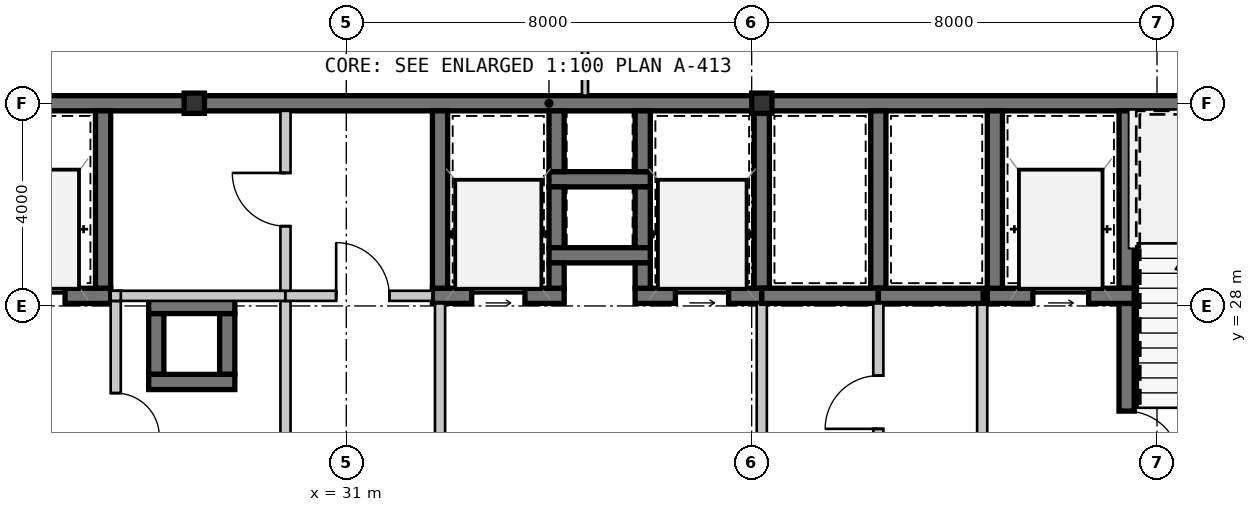
"""IFC4 building model, lengths in metres.
Left out: names, types, materials, properties, quantities, classifications, styles, units other than length and angle.
Written with IfcOpenShell. Run it as: python <this file> out.ifc"""

import sys

from ifc_helpers import new_model, si_unit, direction, frame, frame_2d, origin, origin_2d, place, context, subcontext, project, spatial, rectangle, hollow_rectangle, extrude, source, transform, mapped, element, fill, save


model = new_model("IFC4")
c1 = context("Model", 3, precision=1e-05, world=origin(), true_north=direction((0.0, 1.0)))
c2 = subcontext(c1, "Body", "Model", "MODEL_VIEW")
j1 = project(units=[si_unit("LENGTHUNIT", "METRE"), si_unit("PLANEANGLEUNIT", "RADIAN")], contexts=[c1])
p1 = place(None, origin())
s1 = spatial("IfcSite", under=j1, at=p1, CompositionType="ELEMENT")
p2 = place(p1, origin())
s2 = spatial("IfcBuilding", under=s1, at=p2, CompositionType="ELEMENT")
p3 = place(p2, frame((0.0, 0.0, 120.4)))
s3 = spatial("IfcBuildingStorey", under=s2, at=p3, CompositionType="ELEMENT", Elevation=120.4)
m1 = source(origin(), c2, "Body", "SweptSolid", [
    extrude(hollow_rectangle(XDim=0.4, YDim=0.4, WallThickness=0.016, at=origin_2d()), origin(), (0.0, 0.0, 1.0), 3.15),
])
for number, where, z_axis, x_axis in (
    (1, (28.0, 32.0, 0.0), (0.0, 0.0, 1.0), (1.0, 0.0, 0.0)),
    (2, (39.2, 32.0, 0.0), (0.0, 0.0, 1.0), (1.0, 0.0, 0.0)),
):
    element("IfcColumn", number, at=place(p3, frame(where, z_axis=z_axis, x_axis=x_axis)), inside=s3, PredefinedType="COLUMN", context=c2, shape_type="MappedRepresentation", body=[
        mapped(m1, transform((0.0, 0.0, 0.0), scale=1.0)),
    ])
m2 = source(origin(), c2, "Body", "SweptSolid", [
    extrude(rectangle(XDim=9.15, YDim=0.3, at=frame_2d((4.575, 0.0))), origin(), (0.0, 0.0, 1.0), 2.93),
])
p4 = place(p3, frame((18.85, 32.0, 0.0), z_axis=(0.0, 0.0, 1.0), x_axis=(1.0, 0.0, 0.0)))
e3 = element("IfcWall", 3, at=p4, inside=s3, PredefinedType="SHEAR", context=c2, shape_type="MappedRepresentation", body=[
    mapped(m2, transform((0.0, 0.0, 0.0), scale=1.0)),
])
m3 = source(origin(), c2, "Body", "SweptSolid", [
    extrude(rectangle(XDim=11.2, YDim=0.3, at=frame_2d((5.6, 0.0))), origin(), (0.0, 0.0, 1.0), 2.93),
])
p5 = place(p3, frame((28.0, 32.0, 0.0), z_axis=(0.0, 0.0, 1.0), x_axis=(1.0, 0.0, 0.0)))
e4 = element("IfcWall", 4, at=p5, inside=s3, PredefinedType="SHEAR", context=c2, shape_type="MappedRepresentation", body=[
    mapped(m3, transform((0.0, 0.0, 0.0), scale=1.0)),
])
m4 = source(origin(), c2, "Body", "SweptSolid", [
    extrude(rectangle(XDim=11.95, YDim=0.3, at=frame_2d((5.975, 0.0))), origin(), (0.0, 0.0, 1.0), 2.93),
])
p6 = place(p3, frame((39.2, 32.0, 0.0), z_axis=(0.0, 0.0, 1.0), x_axis=(1.0, 0.0, 0.0)))
e5 = element("IfcWall", 5, at=p6, inside=s3, PredefinedType="SHEAR", context=c2, shape_type="MappedRepresentation", body=[
    mapped(m4, transform((0.0, 0.0, 0.0), scale=1.0)),
])
m5 = source(origin(), c2, "Body", "SweptSolid", [
    extrude(rectangle(XDim=2.9, YDim=0.3, at=frame_2d((1.45, 0.0))), origin(), (0.0, 0.0, 1.0), 2.93),
])
p7 = place(p3, frame((23.45, 28.2, 0.0), z_axis=(0.0, 0.0, 1.0), x_axis=(1.0, 0.0, 0.0)))
e6 = element("IfcWall", 6, at=p7, inside=s3, PredefinedType="SHEAR", context=c2, shape_type="MappedRepresentation", body=[
    mapped(m5, transform((0.0, 0.0, 0.0), scale=1.0)),
])
m6 = source(origin(), c2, "Body", "SweptSolid", [
    extrude(rectangle(XDim=1.1, YDim=2.15, at=frame_2d((0.55, 1.075))), frame((0.0, 0.16, 0.0), z_axis=(0.0, -1.0, 0.0), x_axis=(1.0, 0.0, 0.0)), (0.0, 0.0, 1.0), 0.32),
])
p8 = place(p7, frame((0.9, 0.0, 0.0)))
e7 = element("IfcOpeningElement", 7, at=p8, cuts=e6, PredefinedType="OPENING", context=c2, shape_type="MappedRepresentation", body=[
    mapped(m6, transform((0.0, 0.0, 0.0), scale=1.0)),
])
m7 = source(origin(), c2, "Body", "SweptSolid", [
    extrude(rectangle(XDim=3.5, YDim=0.3, at=frame_2d((1.75, 0.0))), origin(), (0.0, 0.0, 1.0), 2.93),
])
p9 = place(p3, frame((26.2, 28.35, 0.0), z_axis=(0.0, 0.0, 1.0), x_axis=(0.0, 1.0, 0.0)))
e8 = element("IfcWall", 8, at=p9, inside=s3, PredefinedType="SHEAR", context=c2, shape_type="MappedRepresentation", body=[
    mapped(m7, transform((0.0, 0.0, 0.0), scale=1.0)),
])
m8 = source(origin(), c2, "Body", "SweptSolid", [
    extrude(rectangle(XDim=4.0, YDim=0.2, at=frame_2d((2.0, 0.0))), origin(), (0.0, 0.0, 1.0), 2.93),
])
p10 = place(p3, frame((26.45, 24.1, 0.0), z_axis=(0.0, 0.0, 1.0), x_axis=(0.0, 1.0, 0.0)))
e9 = element("IfcWall", 9, at=p10, inside=s3, PredefinedType="SOLIDWALL", context=c2, shape_type="MappedRepresentation", body=[
    mapped(m8, transform((0.0, 0.0, 0.0), scale=1.0)),
])
m9 = source(origin(), c2, "Body", "SweptSolid", [
    extrude(rectangle(XDim=0.86, YDim=2.1, at=frame_2d((0.43, 1.05))), frame((0.0, 0.11, 0.0), z_axis=(0.0, -1.0, 0.0), x_axis=(1.0, 0.0, 0.0)), (0.0, 0.0, 1.0), 0.22),
])
p11 = place(p10, frame((1.32, 0.0, 0.0)))
e10 = element("IfcOpeningElement", 10, at=p11, cuts=e9, PredefinedType="OPENING", context=c2, shape_type="MappedRepresentation", body=[
    mapped(m9, transform((0.0, 0.0, 0.0), scale=1.0)),
])
p12 = place(p3, frame((46.4, 31.85, 0.0), z_axis=(0.0, 0.0, 1.0), x_axis=(0.0, -1.0, 0.0)))
e11 = element("IfcWall", 11, at=p12, inside=s3, PredefinedType="SHEAR", context=c2, shape_type="MappedRepresentation", body=[
    mapped(m7, transform((0.0, 0.0, 0.0), scale=1.0)),
])
m10 = source(origin(), c2, "Body", "SweptSolid", [
    extrude(rectangle(XDim=3.9, YDim=0.3, at=frame_2d((1.95, 0.0))), origin(), (0.0, 0.0, 1.0), 2.93),
])
p13 = place(p3, frame((46.4, 28.05, 0.0), z_axis=(0.0, 0.0, 1.0), x_axis=(0.0, -1.0, 0.0)))
e12 = element("IfcWall", 12, at=p13, inside=s3, PredefinedType="SHEAR", context=c2, shape_type="MappedRepresentation", body=[
    mapped(m10, transform((0.0, 0.0, 0.0), scale=1.0)),
])
m11 = source(origin(), c2, "Body", "SweptSolid", [
    extrude(rectangle(XDim=1.05, YDim=2.1, at=frame_2d((0.525, 1.05))), frame((0.0, 0.16, 0.0), z_axis=(0.0, -1.0, 0.0), x_axis=(1.0, 0.0, 0.0)), (0.0, 0.0, 1.0), 0.32),
])
p14 = place(p13, frame((2.125, 0.0, 0.0)))
e13 = element("IfcOpeningElement", 13, at=p14, cuts=e12, PredefinedType="OPENING", context=c2, shape_type="MappedRepresentation", body=[
    mapped(m11, transform((0.0, 0.0, 0.0), scale=1.0)),
])
p15 = place(p3, frame((43.65, 28.2, 0.0), z_axis=(0.0, 0.0, 1.0), x_axis=(1.0, 0.0, 0.0)))
e14 = element("IfcWall", 14, at=p15, inside=s3, PredefinedType="SHEAR", context=c2, shape_type="MappedRepresentation", body=[
    mapped(m5, transform((0.0, 0.0, 0.0), scale=1.0)),
])
p16 = place(p15, frame((0.9, 0.0, 0.0)))
e15 = element("IfcOpeningElement", 15, at=p16, cuts=e14, PredefinedType="OPENING", context=c2, shape_type="MappedRepresentation", body=[
    mapped(m6, transform((0.0, 0.0, 0.0), scale=1.0)),
])
p17 = place(p3, frame((43.8, 31.85, 0.0), z_axis=(0.0, 0.0, 1.0), x_axis=(0.0, -1.0, 0.0)))
e16 = element("IfcWall", 16, at=p17, inside=s3, PredefinedType="SHEAR", context=c2, shape_type="MappedRepresentation", body=[
    mapped(m7, transform((0.0, 0.0, 0.0), scale=1.0)),
])
m12 = source(origin(), c2, "Body", "SweptSolid", [
    extrude(rectangle(XDim=3.95, YDim=0.2, at=frame_2d((1.975, 0.0))), origin(), (0.0, 0.0, 1.0), 2.93),
])
p18 = place(p3, frame((43.55, 28.05, 0.0), z_axis=(0.0, 0.0, 1.0), x_axis=(0.0, -1.0, 0.0)))
e17 = element("IfcWall", 17, at=p18, inside=s3, PredefinedType="SOLIDWALL", context=c2, shape_type="MappedRepresentation", body=[
    mapped(m12, transform((0.0, 0.0, 0.0), scale=1.0)),
])
m13 = source(origin(), c2, "Body", "SweptSolid", [
    extrude(rectangle(XDim=2.0, YDim=0.3, at=frame_2d((1.0, 0.0))), origin(), (0.0, 0.0, 1.0), 2.93),
])
p19 = place(p3, frame((35.0, 30.5, 0.0), z_axis=(0.0, 0.0, 1.0), x_axis=(1.0, 0.0, 0.0)))
e18 = element("IfcWall", 18, at=p19, inside=s3, PredefinedType="SHEAR", context=c2, shape_type="MappedRepresentation", body=[
    mapped(m13, transform((0.0, 0.0, 0.0), scale=1.0)),
])
m14 = source(origin(), c2, "Body", "SweptSolid", [
    extrude(rectangle(XDim=1.2, YDim=0.3, at=frame_2d((0.6, 0.0))), origin(), (0.0, 0.0, 1.0), 2.93),
])
for number, where, z_axis, x_axis in (
    (19, (35.15, 31.85, 0.0), (0.0, 0.0, 1.0), (0.0, -1.0, 0.0)),
    (20, (36.85, 30.65, 0.0), (0.0, 0.0, 1.0), (0.0, 1.0, 0.0)),
    (21, (35.15, 30.35, 0.0), (0.0, 0.0, 1.0), (0.0, -1.0, 0.0)),
    (22, (36.85, 29.15, 0.0), (0.0, 0.0, 1.0), (0.0, 1.0, 0.0)),
):
    element("IfcWall", number, at=place(p3, frame(where, z_axis=z_axis, x_axis=x_axis)), inside=s3, PredefinedType="SHEAR", context=c2, shape_type="MappedRepresentation", body=[
        mapped(m14, transform((0.0, 0.0, 0.0), scale=1.0)),
    ])
p20 = place(p3, frame((35.0, 29.0, 0.0), z_axis=(0.0, 0.0, 1.0), x_axis=(1.0, 0.0, 0.0)))
e23 = element("IfcWall", 23, at=p20, inside=s3, PredefinedType="SHEAR", context=c2, shape_type="MappedRepresentation", body=[
    mapped(m13, transform((0.0, 0.0, 0.0), scale=1.0)),
])
for number, where, z_axis, x_axis in (
    (24, (28.65, 26.65, 0.0), (0.0, 0.0, 1.0), (0.0, 1.0, 0.0)),
    (25, (27.25, 27.85, 0.0), (0.0, 0.0, 1.0), (0.0, -1.0, 0.0)),
):
    element("IfcWall", number, at=place(p3, frame(where, z_axis=z_axis, x_axis=x_axis)), inside=s3, PredefinedType="SHEAR", context=c2, shape_type="MappedRepresentation", body=[
        mapped(m14, transform((0.0, 0.0, 0.0), scale=1.0)),
    ])
m15 = source(origin(), c2, "Body", "SweptSolid", [
    extrude(rectangle(XDim=1.7, YDim=0.3, at=frame_2d((0.85, 0.0))), origin(), (0.0, 0.0, 1.0), 2.93),
])
for number, where, z_axis, x_axis in (
    (26, (28.8, 28.0, 0.0), (0.0, 0.0, 1.0), (-1.0, 0.0, 0.0)),
    (27, (27.1, 26.5, 0.0), (0.0, 0.0, 1.0), (1.0, 0.0, 0.0)),
):
    element("IfcWall", number, at=place(p3, frame(where, z_axis=z_axis, x_axis=x_axis)), inside=s3, PredefinedType="SHEAR", context=c2, shape_type="MappedRepresentation", body=[
        mapped(m15, transform((0.0, 0.0, 0.0), scale=1.0)),
    ])
m16 = source(origin(), c2, "Body", "SweptSolid", [
    extrude(rectangle(XDim=2.6, YDim=0.3, at=frame_2d((1.3, 0.0))), origin(), (0.0, 0.0, 1.0), 2.93),
])
p21 = place(p3, frame((32.7, 28.2, 0.0), z_axis=(0.0, 0.0, 1.0), x_axis=(1.0, 0.0, 0.0)))
e28 = element("IfcWall", 28, at=p21, inside=s3, PredefinedType="SHEAR", context=c2, shape_type="MappedRepresentation", body=[
    mapped(m16, transform((0.0, 0.0, 0.0), scale=1.0)),
])
m17 = source(origin(), c2, "Body", "SweptSolid", [
    extrude(rectangle(XDim=1.05, YDim=2.15, at=frame_2d((0.525, 1.075))), frame((0.0, 0.16, 0.0), z_axis=(0.0, -1.0, 0.0), x_axis=(1.0, 0.0, 0.0)), (0.0, 0.0, 1.0), 0.32),
])
p22 = place(p21, frame((0.775, 0.0, 0.0)))
e29 = element("IfcOpeningElement", 29, at=p22, cuts=e28, PredefinedType="OPENING", context=c2, shape_type="MappedRepresentation", body=[
    mapped(m17, transform((0.0, 0.0, 0.0), scale=1.0)),
])
m18 = source(origin(), c2, "Body", "SweptSolid", [
    extrude(rectangle(XDim=0.5, YDim=0.3, at=frame_2d((0.25, 0.0))), origin(), (0.0, 0.0, 1.0), 2.93),
])
p23 = place(p3, frame((35.15, 28.35, 0.0), z_axis=(0.0, 0.0, 1.0), x_axis=(0.0, 1.0, 0.0)))
e30 = element("IfcWall", 30, at=p23, inside=s3, PredefinedType="SHEAR", context=c2, shape_type="MappedRepresentation", body=[
    mapped(m18, transform((0.0, 0.0, 0.0), scale=1.0)),
])
p24 = place(p3, frame((32.85, 31.85, 0.0), z_axis=(0.0, 0.0, 1.0), x_axis=(0.0, -1.0, 0.0)))
e31 = element("IfcWall", 31, at=p24, inside=s3, PredefinedType="SHEAR", context=c2, shape_type="MappedRepresentation", body=[
    mapped(m7, transform((0.0, 0.0, 0.0), scale=1.0)),
])
m19 = source(origin(), c2, "Body", "SweptSolid", [
    extrude(rectangle(XDim=2.5, YDim=0.3, at=frame_2d((1.25, 0.0))), origin(), (0.0, 0.0, 1.0), 2.93),
])
p25 = place(p3, frame((36.7, 28.2, 0.0), z_axis=(0.0, 0.0, 1.0), x_axis=(1.0, 0.0, 0.0)))
e32 = element("IfcWall", 32, at=p25, inside=s3, PredefinedType="SHEAR", context=c2, shape_type="MappedRepresentation", body=[
    mapped(m19, transform((0.0, 0.0, 0.0), scale=1.0)),
])
p26 = place(p25, frame((0.795, 0.0, 0.0)))
e33 = element("IfcOpeningElement", 33, at=p26, cuts=e32, PredefinedType="OPENING", context=c2, shape_type="MappedRepresentation", body=[
    mapped(m17, transform((0.0, 0.0, 0.0), scale=1.0)),
])
p27 = place(p3, frame((36.85, 28.85, 0.0), z_axis=(0.0, 0.0, 1.0), x_axis=(0.0, -1.0, 0.0)))
e34 = element("IfcWall", 34, at=p27, inside=s3, PredefinedType="SHEAR", context=c2, shape_type="MappedRepresentation", body=[
    mapped(m18, transform((0.0, 0.0, 0.0), scale=1.0)),
])
p28 = place(p3, frame((39.2, 28.35, 0.0), z_axis=(0.0, 0.0, 1.0), x_axis=(0.0, 1.0, 0.0)))
e35 = element("IfcWall", 35, at=p28, inside=s3, PredefinedType="SHEAR", context=c2, shape_type="MappedRepresentation", body=[
    mapped(m7, transform((0.0, 0.0, 0.0), scale=1.0)),
])
p29 = place(p3, frame((32.85, 24.1, 0.0), z_axis=(0.0, 0.0, 1.0), x_axis=(0.0, 1.0, 0.0)))
e36 = element("IfcWall", 36, at=p29, inside=s3, PredefinedType="SOLIDWALL", context=c2, shape_type="MappedRepresentation", body=[
    mapped(m12, transform((0.0, 0.0, 0.0), scale=1.0)),
])
m20 = source(origin(), c2, "Body", "SweptSolid", [
    extrude(rectangle(XDim=3.95, YDim=0.2, at=frame_2d((1.975, 0.0))), origin(), (0.0, 0.0, 1.0), 2.47),
])
p30 = place(p3, frame((39.2, 28.05, 0.0), z_axis=(0.0, 0.0, 1.0), x_axis=(0.0, -1.0, 0.0)))
e37 = element("IfcWall", 37, at=p30, inside=s3, PredefinedType="SOLIDWALL", context=c2, shape_type="MappedRepresentation", body=[
    mapped(m20, transform((0.0, 0.0, 0.0), scale=1.0)),
])
p31 = place(p3, frame((41.5, 28.35, 0.0), z_axis=(0.0, 0.0, 1.0), x_axis=(0.0, 1.0, 0.0)))
e38 = element("IfcWall", 38, at=p31, inside=s3, PredefinedType="SHEAR", context=c2, shape_type="MappedRepresentation", body=[
    mapped(m7, transform((0.0, 0.0, 0.0), scale=1.0)),
])
m21 = source(origin(), c2, "Body", "SweptSolid", [
    extrude(rectangle(XDim=2.3, YDim=0.3, at=frame_2d((1.15, 0.0))), origin(), (0.0, 0.0, 1.0), 2.93),
])
p32 = place(p3, frame((39.2, 28.2, 0.0), z_axis=(0.0, 0.0, 1.0), x_axis=(1.0, 0.0, 0.0)))
e39 = element("IfcWall", 39, at=p32, inside=s3, PredefinedType="SHEAR", context=c2, shape_type="MappedRepresentation", body=[
    mapped(m21, transform((0.0, 0.0, 0.0), scale=1.0)),
])
m22 = source(origin(), c2, "Body", "SweptSolid", [
    extrude(rectangle(XDim=2.07, YDim=0.3, at=frame_2d((1.035, 0.0))), origin(), (0.0, 0.0, 1.0), 2.93),
])
p33 = place(p3, frame((41.5, 28.2, 0.0), z_axis=(0.0, 0.0, 1.0), x_axis=(1.0, 0.0, 0.0)))
e40 = element("IfcWall", 40, at=p33, inside=s3, PredefinedType="SHEAR", context=c2, shape_type="MappedRepresentation", body=[
    mapped(m22, transform((0.0, 0.0, 0.0), scale=1.0)),
])
p34 = place(p3, frame((29.8, 28.1, 0.0), z_axis=(0.0, 0.0, 1.0), x_axis=(0.0, -1.0, 0.0)))
e41 = element("IfcWall", 41, at=p34, inside=s3, PredefinedType="SOLIDWALL", context=c2, shape_type="MappedRepresentation", body=[
    mapped(m8, transform((0.0, 0.0, 0.0), scale=1.0)),
])
m23 = source(origin(), c2, "Body", "SweptSolid", [
    extrude(rectangle(XDim=3.35, YDim=0.2, at=frame_2d((1.675, 0.0))), origin(), (0.0, 0.0, 1.0), 2.93),
])
p35 = place(p3, frame((26.45, 28.2, 0.0), z_axis=(0.0, 0.0, 1.0), x_axis=(1.0, 0.0, 0.0)))
e42 = element("IfcWall", 42, at=p35, inside=s3, PredefinedType="SOLIDWALL", context=c2, shape_type="MappedRepresentation", body=[
    mapped(m23, transform((0.0, 0.0, 0.0), scale=1.0)),
])
m24 = source(origin(), c2, "Body", "SweptSolid", [
    extrude(rectangle(XDim=2.9, YDim=0.2, at=frame_2d((1.45, 0.0))), origin(), (0.0, 0.0, 1.0), 2.93),
])
p36 = place(p3, frame((29.8, 28.2, 0.0), z_axis=(0.0, 0.0, 1.0), x_axis=(1.0, 0.0, 0.0)))
e43 = element("IfcWall", 43, at=p36, inside=s3, PredefinedType="SOLIDWALL", context=c2, shape_type="MappedRepresentation", body=[
    mapped(m24, transform((0.0, 0.0, 0.0), scale=1.0)),
])
m25 = source(origin(), c2, "Body", "SweptSolid", [
    extrude(rectangle(XDim=1.05, YDim=2.1, at=frame_2d((0.525, 1.05))), frame((0.0, 0.11, 0.0), z_axis=(0.0, -1.0, 0.0), x_axis=(1.0, 0.0, 0.0)), (0.0, 0.0, 1.0), 0.22),
])
p37 = place(p36, frame((1.0, 0.0, 0.0)))
e44 = element("IfcOpeningElement", 44, at=p37, cuts=e43, PredefinedType="OPENING", context=c2, shape_type="MappedRepresentation", body=[
    mapped(m25, transform((0.0, 0.0, 0.0), scale=1.0)),
])
m26 = source(origin(), c2, "Body", "SweptSolid", [
    extrude(rectangle(XDim=3.55, YDim=0.2, at=frame_2d((1.775, 0.0))), origin(), (0.0, 0.0, 1.0), 2.93),
])
p38 = place(p3, frame((29.8, 31.85, 0.0), z_axis=(0.0, 0.0, 1.0), x_axis=(0.0, -1.0, 0.0)))
e45 = element("IfcWall", 45, at=p38, inside=s3, PredefinedType="SOLIDWALL", context=c2, shape_type="MappedRepresentation", body=[
    mapped(m26, transform((0.0, 0.0, 0.0), scale=1.0)),
])
p39 = place(p38, frame((1.225, 0.0, 0.0)))
e46 = element("IfcOpeningElement", 46, at=p39, cuts=e45, PredefinedType="OPENING", context=c2, shape_type="MappedRepresentation", body=[
    mapped(m25, transform((0.0, 0.0, 0.0), scale=1.0)),
])
p40 = place(p3, frame((41.5, 28.05, 0.0), z_axis=(0.0, 0.0, 1.0), x_axis=(0.0, -1.0, 0.0)))
e47 = element("IfcWall", 47, at=p40, inside=s3, PredefinedType="SOLIDWALL", context=c2, shape_type="MappedRepresentation", body=[
    mapped(m12, transform((0.0, 0.0, 0.0), scale=1.0)),
])
p41 = place(p40, frame((1.425, 0.0, 0.0)))
e48 = element("IfcOpeningElement", 48, at=p41, cuts=e47, PredefinedType="OPENING", context=c2, shape_type="MappedRepresentation", body=[
    mapped(m25, transform((0.0, 0.0, 0.0), scale=1.0)),
])
m27 = source(origin(), c2, "Body", "SweptSolid", [
    extrude(rectangle(XDim=4.727, YDim=0.12, at=frame_2d((2.364, 0.0))), origin(), (0.0, 0.0, 1.0), 2.93),
])
p42 = place(p3, frame((35.711, 36.877, 0.0), z_axis=(0.0, 0.0, 1.0), x_axis=(0.0, -1.0, 0.0)))
e49 = element("IfcWall", 49, at=p42, inside=s3, PredefinedType="PARTITIONING", context=c2, shape_type="MappedRepresentation", body=[
    mapped(m27, transform((0.0, 0.0, 0.0), scale=1.0)),
])
m28 = source(origin(), c2, "Body", "SweptSolid", [
    extrude(rectangle(XDim=0.2, YDim=0.2, at=frame_2d((0.1, 0.0))), origin(), (0.0, 0.0, 1.0), 2.93),
])
p43 = place(p3, frame((26.35, 28.2, 0.0), z_axis=(0.0, 0.0, 1.0), x_axis=(1.0, 0.0, 0.0)))
e50 = element("IfcWall", 50, at=p43, inside=s3, PredefinedType="SOLIDWALL", context=c2, shape_type="MappedRepresentation", body=[
    mapped(m28, transform((0.0, 0.0, 0.0), scale=1.0)),
])
m29 = source(origin(), c2, "Body", "SweptSolid", [
    extrude(rectangle(XDim=1.1, YDim=2.15, at=frame_2d((0.55, 1.075))), frame((0.0, 0.025, 0.0), z_axis=(0.0, -1.0, 0.0), x_axis=(1.0, 0.0, 0.0)), (0.0, 0.0, 1.0), 0.05),
])
p44 = place(p8, origin())
e51 = element("IfcDoor", 51, at=p44, inside=s3, OperationType="SLIDING_TO_LEFT", PredefinedType="DOOR", context=c2, shape_type="MappedRepresentation", body=[
    mapped(m29, transform((0.0, 0.0, 0.0), scale=1.0)),
])
fill(e7, e51)
m30 = source(origin(), c2, "Body", "SweptSolid", [
    extrude(rectangle(XDim=1.05, YDim=2.1, at=frame_2d((0.525, 1.05))), frame((0.0, 0.025, 0.0), z_axis=(0.0, -1.0, 0.0), x_axis=(1.0, 0.0, 0.0)), (0.0, 0.0, 1.0), 0.05),
])
p45 = place(p14, origin())
e52 = element("IfcDoor", 52, at=p45, inside=s3, OperationType="SINGLE_SWING_RIGHT", PredefinedType="DOOR", context=c2, shape_type="MappedRepresentation", body=[
    mapped(m30, transform((0.0, 0.0, 0.0), scale=1.0)),
])
fill(e13, e52)
p46 = place(p16, origin())
e53 = element("IfcDoor", 53, at=p46, inside=s3, OperationType="SLIDING_TO_LEFT", PredefinedType="DOOR", context=c2, shape_type="MappedRepresentation", body=[
    mapped(m29, transform((0.0, 0.0, 0.0), scale=1.0)),
])
fill(e15, e53)
m31 = source(origin(), c2, "Body", "SweptSolid", [
    extrude(rectangle(XDim=1.05, YDim=2.15, at=frame_2d((0.525, 1.075))), frame((0.0, 0.025, 0.0), z_axis=(0.0, -1.0, 0.0), x_axis=(1.0, 0.0, 0.0)), (0.0, 0.0, 1.0), 0.05),
])
p47 = place(p22, origin())
e54 = element("IfcDoor", 54, at=p47, inside=s3, OperationType="SLIDING_TO_LEFT", PredefinedType="DOOR", context=c2, shape_type="MappedRepresentation", body=[
    mapped(m31, transform((0.0, 0.0, 0.0), scale=1.0)),
])
fill(e29, e54)
p48 = place(p26, origin())
e55 = element("IfcDoor", 55, at=p48, inside=s3, OperationType="SLIDING_TO_LEFT", PredefinedType="DOOR", context=c2, shape_type="MappedRepresentation", body=[
    mapped(m31, transform((0.0, 0.0, 0.0), scale=1.0)),
])
fill(e33, e55)
p49 = place(p37, origin())
e56 = element("IfcDoor", 56, at=p49, inside=s3, OperationType="SINGLE_SWING_LEFT", PredefinedType="DOOR", context=c2, shape_type="MappedRepresentation", body=[
    mapped(m30, transform((0.0, 0.0, 0.0), scale=1.0)),
])
fill(e44, e56)
p50 = place(p39, frame((1.05, 0.0, 0.0), z_axis=(0.0, 0.0, 1.0), x_axis=(-1.0, 0.0, 0.0)))
e57 = element("IfcDoor", 57, at=p50, inside=s3, OperationType="SINGLE_SWING_RIGHT", PredefinedType="DOOR", context=c2, shape_type="MappedRepresentation", body=[
    mapped(m30, transform((0.0, 0.0, 0.0), scale=1.0)),
])
fill(e46, e57)
p51 = place(p41, frame((1.05, 0.0, 0.0), z_axis=(0.0, 0.0, 1.0), x_axis=(-1.0, 0.0, 0.0)))
e58 = element("IfcDoor", 58, at=p51, inside=s3, OperationType="SINGLE_SWING_LEFT", PredefinedType="DOOR", context=c2, shape_type="MappedRepresentation", body=[
    mapped(m30, transform((0.0, 0.0, 0.0), scale=1.0)),
])
fill(e48, e58)
m32 = source(origin(), c2, "Body", "SweptSolid", [
    extrude(rectangle(XDim=0.86, YDim=2.1, at=frame_2d((0.43, 1.05))), frame((0.0, 0.025, 0.0), z_axis=(0.0, -1.0, 0.0), x_axis=(1.0, 0.0, 0.0)), (0.0, 0.0, 1.0), 0.05),
])
p52 = place(p11, frame((0.86, 0.0, 0.0), z_axis=(0.0, 0.0, 1.0), x_axis=(-1.0, 0.0, 0.0)))
e59 = element("IfcDoor", 59, at=p52, inside=s3, OperationType="SINGLE_SWING_RIGHT", PredefinedType="DOOR", context=c2, shape_type="MappedRepresentation", body=[
    mapped(m32, transform((0.0, 0.0, 0.0), scale=1.0)),
])
fill(e10, e59)
save(model, sys.argv[1])
